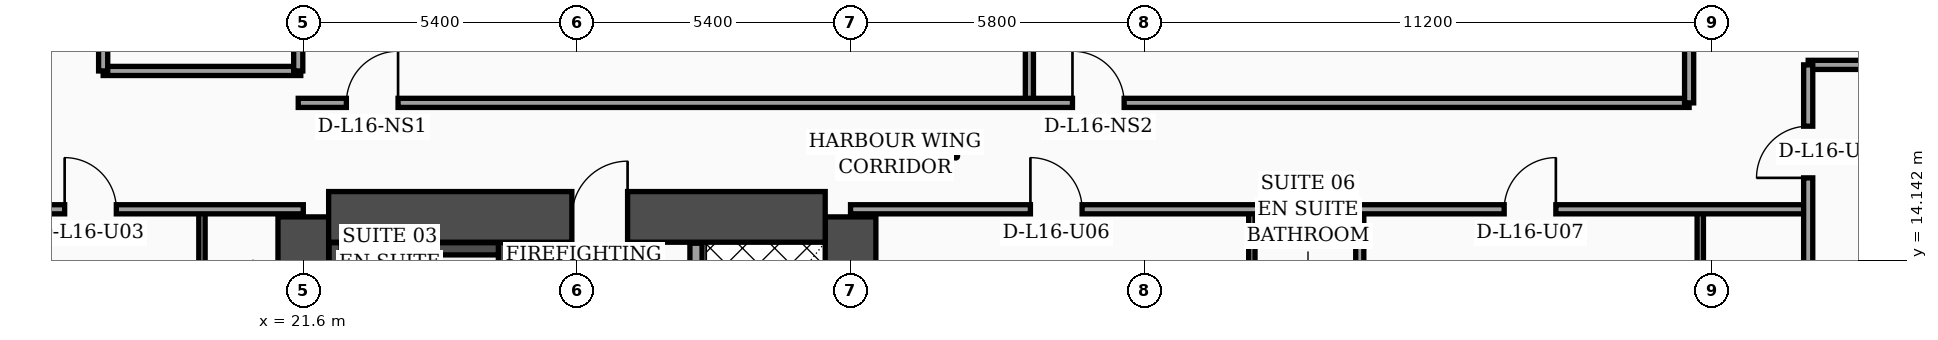
"""IFC4 building model, lengths in metres.
Left out: names, types, materials, properties, quantities, classifications, styles, units other than length and angle.
Written with IfcOpenShell. Run it as: python <this file> out.ifc"""

import sys

from ifc_helpers import new_model, si_unit, direction, frame, frame_2d, origin, place, context, subcontext, project, spatial, rectangle, extrude, element, fill, save


model = new_model("IFC4")
c1 = context("Model", 3, precision=1e-05, world=origin(), true_north=direction((0.0, 1.0)))
c2 = subcontext(c1, "Body", "Model", "MODEL_VIEW")
j1 = project(units=[si_unit("LENGTHUNIT", "METRE"), si_unit("PLANEANGLEUNIT", "RADIAN")], contexts=[c1])
p1 = place(None, origin())
s1 = spatial("IfcSite", under=j1, at=p1, CompositionType="ELEMENT")
p2 = place(p1, origin())
s2 = spatial("IfcBuilding", under=s1, at=p2, CompositionType="ELEMENT")
p3 = place(p2, frame((0.0, 0.0, 69.8)))
s3 = spatial("IfcBuildingStorey", under=s2, at=p3, CompositionType="ELEMENT", Elevation=69.8)
for number, where, z_axis, x_axis in (
    (1, (21.6, 4.6, 0.0), (0.0, 0.0, 1.0), (0.0, 1.0, 0.0)),
    (2, (32.4, 4.6, 0.0), (0.0, 0.0, 1.0), (0.0, 1.0, 0.0)),
):
    element("IfcWall", number, at=place(p3, frame(where, z_axis=z_axis, x_axis=x_axis)), inside=s3, PredefinedType="SHEAR", context=c2, shape_type="SweptSolid", body=[
        extrude(rectangle(XDim=10.4, YDim=1.0, at=frame_2d((5.2, 0.0))), origin(), (0.0, 0.0, 1.0), 3.56),
    ])
p4 = place(p3, frame((22.1, 15.0, 0.0), z_axis=(0.0, 0.0, 1.0), x_axis=(1.0, 0.0, 0.0)))
e3 = element("IfcWall", 3, at=p4, inside=s3, PredefinedType="SHEAR", context=c2, shape_type="SweptSolid", body=[
    extrude(rectangle(XDim=9.8, YDim=1.0, at=frame_2d((4.9, 0.0))), origin(), (0.0, 0.0, 1.0), 3.56),
])
p5 = place(p4, frame((4.8, 0.0, 0.0)))
e4 = element("IfcOpeningElement", 4, at=p5, cuts=e3, PredefinedType="OPENING", context=c2, shape_type="SweptSolid", body=[
    extrude(rectangle(XDim=1.1, YDim=2.2, at=frame_2d((0.55, 1.1))), frame((0.0, 0.51, 0.0), z_axis=(0.0, -1.0, 0.0), x_axis=(1.0, 0.0, 0.0)), (0.0, 0.0, 1.0), 1.02),
])
p6 = place(p3, frame((22.23, 5.1, 0.0), z_axis=(0.0, 0.0, 1.0), x_axis=(0.0, 1.0, 0.0)))
e5 = element("IfcWall", 5, at=p6, inside=s3, PredefinedType="SOLIDWALL", context=c2, shape_type="SweptSolid", body=[
    extrude(rectangle(XDim=9.39, YDim=0.24, at=frame_2d((4.695, 0.0))), origin(), (0.0, 0.0, 1.0), 3.56),
])
p7 = place(p3, frame((25.57, 5.1, 0.0), z_axis=(0.0, 0.0, 1.0), x_axis=(0.0, 1.0, 0.0)))
e6 = element("IfcWall", 6, at=p7, inside=s3, PredefinedType="SOLIDWALL", context=c2, shape_type="SweptSolid", body=[
    extrude(rectangle(XDim=9.39, YDim=0.24, at=frame_2d((4.695, 0.0))), origin(), (0.0, 0.0, 1.0), 3.56),
])
p8 = place(p7, frame((0.35, 0.0, 0.0)))
e7 = element("IfcOpeningElement", 7, at=p8, cuts=e6, PredefinedType="OPENING", context=c2, shape_type="SweptSolid", body=[
    extrude(rectangle(XDim=1.15, YDim=2.2, at=frame_2d((0.575, 1.1))), frame((0.0, 0.13, 0.0), z_axis=(0.0, -1.0, 0.0), x_axis=(1.0, 0.0, 0.0)), (0.0, 0.0, 1.0), 0.26),
])
p9 = place(p3, frame((22.35, 14.37, 0.0), z_axis=(0.0, 0.0, 1.0), x_axis=(1.0, 0.0, 0.0)))
e8 = element("IfcWall", 8, at=p9, inside=s3, PredefinedType="SOLIDWALL", context=c2, shape_type="SweptSolid", body=[
    extrude(rectangle(XDim=3.1, YDim=0.24, at=frame_2d((1.55, 0.0))), origin(), (0.0, 0.0, 1.0), 3.56),
])
p10 = place(p3, frame((29.35, 5.12, 0.0), z_axis=(0.0, 0.0, 1.0), x_axis=(0.0, 1.0, 0.0)))
e9 = element("IfcWall", 9, at=p10, inside=s3, PredefinedType="SOLIDWALL", context=c2, shape_type="SweptSolid", body=[
    extrude(rectangle(XDim=9.36, YDim=0.24, at=frame_2d((4.68, 0.0))), origin(), (0.0, 0.0, 1.0), 3.56),
])
p11 = place(p10, frame((0.55, 0.0, 0.0)))
e10 = element("IfcOpeningElement", 10, at=p11, cuts=e9, PredefinedType="OPENING", context=c2, shape_type="SweptSolid", body=[
    extrude(rectangle(XDim=1.3, YDim=2.35, at=frame_2d((0.65, 1.175))), frame((0.0, 0.13, 0.0), z_axis=(0.0, -1.0, 0.0), x_axis=(1.0, 0.0, 0.0)), (0.0, 0.0, 1.0), 0.26),
])
p12 = place(p3, frame((19.6, 2.44, 0.0), z_axis=(0.0, 0.0, 1.0), x_axis=(0.0, 1.0, 0.0)))
e11 = element("IfcWall", 11, at=p12, inside=s3, PredefinedType="PARTITIONING", context=c2, shape_type="SweptSolid", body=[
    extrude(rectangle(XDim=12.71, YDim=0.125, at=frame_2d((6.355, 0.0))), origin(), (0.0, 0.0, 1.0), 2.34),
])
p13 = place(p12, frame((4.34, 0.0, 0.0)))
e12 = element("IfcOpeningElement", 12, at=p13, cuts=e11, PredefinedType="OPENING", context=c2, shape_type="SweptSolid", body=[
    extrude(rectangle(XDim=0.96, YDim=2.2, at=frame_2d((0.48, 1.1))), frame((0.0, 0.073, 0.0), z_axis=(0.0, -1.0, 0.0), x_axis=(1.0, 0.0, 0.0)), (0.0, 0.0, 1.0), 0.145),
])
p14 = place(p12, frame((10.18, 0.0, 0.0)))
e13 = element("IfcOpeningElement", 13, at=p14, cuts=e11, PredefinedType="OPENING", context=c2, shape_type="SweptSolid", body=[
    extrude(rectangle(XDim=0.9, YDim=2.15, at=frame_2d((0.45, 1.075))), frame((0.0, 0.073, 0.0), z_axis=(0.0, -1.0, 0.0), x_axis=(1.0, 0.0, 0.0)), (0.0, 0.0, 1.0), 0.145),
])
p15 = place(p3, frame((15.15, 15.15, 0.0), z_axis=(0.0, 0.0, 1.0), x_axis=(1.0, 0.0, 0.0)))
e14 = element("IfcWall", 14, at=p15, inside=s3, PredefinedType="PARTITIONING", context=c2, shape_type="SweptSolid", body=[
    extrude(rectangle(XDim=6.45, YDim=0.18, at=frame_2d((3.225, 0.0))), origin(), (0.0, 0.0, 1.0), 2.34),
])
p16 = place(p15, frame((1.74, 0.0, 0.0)))
e15 = element("IfcOpeningElement", 15, at=p16, cuts=e14, PredefinedType="OPENING", context=c2, shape_type="SweptSolid", body=[
    extrude(rectangle(XDim=1.02, YDim=2.2, at=frame_2d((0.51, 1.1))), frame((0.0, 0.1, 0.0), z_axis=(0.0, -1.0, 0.0), x_axis=(1.0, 0.0, 0.0)), (0.0, 0.0, 1.0), 0.2),
])
p17 = place(p3, frame((17.65, 17.88, 0.0), z_axis=(0.0, 0.0, 1.0), x_axis=(1.0, 0.0, 0.0)))
e16 = element("IfcWall", 16, at=p17, inside=s3, PredefinedType="PARTITIONING", context=c2, shape_type="SweptSolid", body=[
    extrude(rectangle(XDim=3.9, YDim=0.18, at=frame_2d((1.95, 0.0))), origin(), (0.0, 0.0, 1.0), 3.56),
])
p18 = place(p3, frame((21.5, 17.88, 0.0), z_axis=(0.0, 0.0, 1.0), x_axis=(0.0, 1.0, 0.0)))
e17 = element("IfcWall", 17, at=p18, inside=s3, PredefinedType="PARTITIONING", context=c2, shape_type="SweptSolid", body=[
    extrude(rectangle(XDim=6.44, YDim=0.18, at=frame_2d((3.22, 0.0))), origin(), (0.0, 0.0, 1.0), 3.56),
])
p19 = place(p3, frame((17.65, 17.88, 0.0), z_axis=(0.0, 0.0, 1.0), x_axis=(0.0, 1.0, 0.0)))
e18 = element("IfcWall", 18, at=p19, inside=s3, PredefinedType="PARTITIONING", context=c2, shape_type="SweptSolid", body=[
    extrude(rectangle(XDim=6.44, YDim=0.18, at=frame_2d((3.22, 0.0))), origin(), (0.0, 0.0, 1.0), 3.56),
])
p20 = place(p19, frame((0.65, 0.0, 0.0)))
e19 = element("IfcOpeningElement", 19, at=p20, cuts=e18, PredefinedType="OPENING", context=c2, shape_type="SweptSolid", body=[
    extrude(rectangle(XDim=0.98, YDim=2.15, at=frame_2d((0.49, 1.075))), frame((0.0, 0.1, 0.0), z_axis=(0.0, -1.0, 0.0), x_axis=(1.0, 0.0, 0.0)), (0.0, 0.0, 1.0), 0.2),
])
p21 = place(p19, frame((3.97, 0.0, 0.0)))
e20 = element("IfcOpeningElement", 20, at=p21, cuts=e18, PredefinedType="OPENING", context=c2, shape_type="SweptSolid", body=[
    extrude(rectangle(XDim=0.96, YDim=2.2, at=frame_2d((0.48, 1.1))), frame((0.0, 0.1, 0.0), z_axis=(0.0, -1.0, 0.0), x_axis=(1.0, 0.0, 0.0)), (0.0, 0.0, 1.0), 0.2),
])
p22 = place(p3, frame((40.32, 2.44, 0.0), z_axis=(0.0, 0.0, 1.0), x_axis=(0.0, 1.0, 0.0)))
e21 = element("IfcWall", 21, at=p22, inside=s3, PredefinedType="PARTITIONING", context=c2, shape_type="SweptSolid", body=[
    extrude(rectangle(XDim=12.71, YDim=0.125, at=frame_2d((6.355, 0.0))), origin(), (0.0, 0.0, 1.0), 2.84),
])
p23 = place(p22, frame((4.35, 0.0, 0.0)))
e22 = element("IfcOpeningElement", 22, at=p23, cuts=e21, PredefinedType="OPENING", context=c2, shape_type="SweptSolid", body=[
    extrude(rectangle(XDim=0.96, YDim=2.2, at=frame_2d((0.48, 1.1))), frame((0.0, 0.073, 0.0), z_axis=(0.0, -1.0, 0.0), x_axis=(1.0, 0.0, 0.0)), (0.0, 0.0, 1.0), 0.145),
])
p24 = place(p22, frame((10.21, 0.0, 0.0)))
e23 = element("IfcOpeningElement", 23, at=p24, cuts=e21, PredefinedType="OPENING", context=c2, shape_type="SweptSolid", body=[
    extrude(rectangle(XDim=0.9, YDim=2.15, at=frame_2d((0.45, 1.075))), frame((0.0, 0.073, 0.0), z_axis=(0.0, -1.0, 0.0), x_axis=(1.0, 0.0, 0.0)), (0.0, 0.0, 1.0), 0.145),
])
p25 = place(p3, frame((49.17, 2.44, 0.0), z_axis=(0.0, 0.0, 1.0), x_axis=(0.0, 1.0, 0.0)))
e24 = element("IfcWall", 24, at=p25, inside=s3, PredefinedType="PARTITIONING", context=c2, shape_type="SweptSolid", body=[
    extrude(rectangle(XDim=12.71, YDim=0.125, at=frame_2d((6.355, 0.0))), origin(), (0.0, 0.0, 1.0), 2.84),
])
p26 = place(p25, frame((4.35, 0.0, 0.0)))
e25 = element("IfcOpeningElement", 25, at=p26, cuts=e24, PredefinedType="OPENING", context=c2, shape_type="SweptSolid", body=[
    extrude(rectangle(XDim=0.96, YDim=2.2, at=frame_2d((0.48, 1.1))), frame((0.0, 0.073, 0.0), z_axis=(0.0, -1.0, 0.0), x_axis=(1.0, 0.0, 0.0)), (0.0, 0.0, 1.0), 0.145),
])
p27 = place(p25, frame((10.21, 0.0, 0.0)))
e26 = element("IfcOpeningElement", 26, at=p27, cuts=e24, PredefinedType="OPENING", context=c2, shape_type="SweptSolid", body=[
    extrude(rectangle(XDim=0.9, YDim=2.15, at=frame_2d((0.45, 1.075))), frame((0.0, 0.073, 0.0), z_axis=(0.0, -1.0, 0.0), x_axis=(1.0, 0.0, 0.0)), (0.0, 0.0, 1.0), 0.145),
])
p28 = place(p3, frame((42.45, 2.44, 0.0), z_axis=(0.0, 0.0, 1.0), x_axis=(0.0, 1.0, 0.0)))
e27 = element("IfcWall", 27, at=p28, inside=s3, PredefinedType="PARTITIONING", context=c2, shape_type="SweptSolid", body=[
    extrude(rectangle(XDim=12.71, YDim=0.16, at=frame_2d((6.355, 0.0))), origin(), (0.0, 0.0, 1.0), 3.04),
])
p29 = place(p3, frame((32.4, 15.15, 0.0), z_axis=(0.0, 0.0, 1.0), x_axis=(1.0, 0.0, 0.0)))
e28 = element("IfcWall", 28, at=p29, inside=s3, PredefinedType="PARTITIONING", context=c2, shape_type="SweptSolid", body=[
    extrude(rectangle(XDim=18.9, YDim=0.18, at=frame_2d((9.45, 0.0))), origin(), (0.0, 0.0, 1.0), 2.84),
])
p30 = place(p29, frame((3.55, 0.0, 0.0)))
e29 = element("IfcOpeningElement", 29, at=p30, cuts=e28, PredefinedType="OPENING", context=c2, shape_type="SweptSolid", body=[
    extrude(rectangle(XDim=1.02, YDim=2.2, at=frame_2d((0.51, 1.1))), frame((0.0, 0.1, 0.0), z_axis=(0.0, -1.0, 0.0), x_axis=(1.0, 0.0, 0.0)), (0.0, 0.0, 1.0), 0.2),
])
p31 = place(p29, frame((12.9, 0.0, 0.0)))
e30 = element("IfcOpeningElement", 30, at=p31, cuts=e28, PredefinedType="OPENING", context=c2, shape_type="SweptSolid", body=[
    extrude(rectangle(XDim=1.02, YDim=2.2, at=frame_2d((0.51, 1.1))), frame((0.0, 0.1, 0.0), z_axis=(0.0, -1.0, 0.0), x_axis=(1.0, 0.0, 0.0)), (0.0, 0.0, 1.0), 0.2),
])
p32 = place(p3, frame((35.93, 17.25, 0.0), z_axis=(0.0, 0.0, 1.0), x_axis=(0.0, 1.0, 0.0)))
e31 = element("IfcWall", 31, at=p32, inside=s3, PredefinedType="PARTITIONING", context=c2, shape_type="SweptSolid", body=[
    extrude(rectangle(XDim=14.0, YDim=0.16, at=frame_2d((7.0, 0.0))), origin(), (0.0, 0.0, 1.0), 2.84),
])
p33 = place(p3, frame((21.5, 17.25, 0.0), z_axis=(0.0, 0.0, 1.0), x_axis=(1.0, 0.0, 0.0)))
e32 = element("IfcWall", 32, at=p33, inside=s3, PredefinedType="PARTITIONING", context=c2, shape_type="SweptSolid", body=[
    extrude(rectangle(XDim=27.45, YDim=0.18, at=frame_2d((13.725, 0.0))), origin(), (0.0, 0.0, 1.0), 2.84),
])
p34 = place(p33, frame((0.95, 0.0, 0.0)))
e33 = element("IfcOpeningElement", 33, at=p34, cuts=e32, PredefinedType="OPENING", context=c2, shape_type="SweptSolid", body=[
    extrude(rectangle(XDim=1.02, YDim=2.2, at=frame_2d((0.51, 1.1))), frame((0.0, 0.1, 0.0), z_axis=(0.0, -1.0, 0.0), x_axis=(1.0, 0.0, 0.0)), (0.0, 0.0, 1.0), 0.2),
])
p35 = place(p33, frame((15.28, 0.0, 0.0)))
e34 = element("IfcOpeningElement", 34, at=p35, cuts=e32, PredefinedType="OPENING", context=c2, shape_type="SweptSolid", body=[
    extrude(rectangle(XDim=1.02, YDim=2.2, at=frame_2d((0.51, 1.1))), frame((0.0, 0.1, 0.0), z_axis=(0.0, -1.0, 0.0), x_axis=(1.0, 0.0, 0.0)), (0.0, 0.0, 1.0), 0.2),
])
p36 = place(p3, frame((48.95, 17.25, 0.0), z_axis=(0.0, 0.0, 1.0), x_axis=(0.0, 1.0, 0.0)))
e35 = element("IfcWall", 35, at=p36, inside=s3, PredefinedType="PARTITIONING", context=c2, shape_type="SweptSolid", body=[
    extrude(rectangle(XDim=20.15, YDim=0.18, at=frame_2d((10.075, 0.0))), origin(), (0.0, 0.0, 1.0), 2.84),
])
p37 = place(p3, frame((51.3, 18.0, 0.0), z_axis=(0.0, 0.0, 1.0), x_axis=(1.0, 0.0, 0.0)))
e36 = element("IfcWall", 36, at=p37, inside=s3, PredefinedType="PARTITIONING", context=c2, shape_type="SweptSolid", body=[
    extrude(rectangle(XDim=8.33, YDim=0.18, at=frame_2d((4.165, 0.0))), origin(), (0.0, 0.0, 1.0), 3.04),
])
p38 = place(p3, frame((51.3, 2.44, 0.0), z_axis=(0.0, 0.0, 1.0), x_axis=(0.0, 1.0, 0.0)))
e37 = element("IfcWall", 37, at=p38, inside=s3, PredefinedType="PARTITIONING", context=c2, shape_type="SweptSolid", body=[
    extrude(rectangle(XDim=15.56, YDim=0.18, at=frame_2d((7.78, 0.0))), origin(), (0.0, 0.0, 1.0), 3.04),
])
p39 = place(p38, frame((13.33, 0.0, 0.0)))
e38 = element("IfcOpeningElement", 38, at=p39, cuts=e37, PredefinedType="OPENING", context=c2, shape_type="SweptSolid", body=[
    extrude(rectangle(XDim=1.02, YDim=2.2, at=frame_2d((0.51, 1.1))), frame((0.0, 0.1, 0.0), z_axis=(0.0, -1.0, 0.0), x_axis=(1.0, 0.0, 0.0)), (0.0, 0.0, 1.0), 0.2),
])
p40 = place(p16, origin())
e39 = element("IfcDoor", 39, at=p40, inside=s3, OperationType="SINGLE_SWING_LEFT", PredefinedType="DOOR", context=c2, shape_type="SweptSolid", body=[
    extrude(rectangle(XDim=1.02, YDim=2.2, at=frame_2d((0.51, 1.1))), frame((0.0, 0.025, 0.0), z_axis=(0.0, -1.0, 0.0), x_axis=(1.0, 0.0, 0.0)), (0.0, 0.0, 1.0), 0.05),
])
fill(e15, e39)
p41 = place(p30, origin())
e40 = element("IfcDoor", 40, at=p41, inside=s3, OperationType="SINGLE_SWING_LEFT", PredefinedType="DOOR", context=c2, shape_type="SweptSolid", body=[
    extrude(rectangle(XDim=1.02, YDim=2.2, at=frame_2d((0.51, 1.1))), frame((0.0, 0.025, 0.0), z_axis=(0.0, -1.0, 0.0), x_axis=(1.0, 0.0, 0.0)), (0.0, 0.0, 1.0), 0.05),
])
fill(e29, e40)
p42 = place(p31, origin())
e41 = element("IfcDoor", 41, at=p42, inside=s3, OperationType="SINGLE_SWING_RIGHT", PredefinedType="DOOR", context=c2, shape_type="SweptSolid", body=[
    extrude(rectangle(XDim=1.02, YDim=2.2, at=frame_2d((0.51, 1.1))), frame((0.0, 0.025, 0.0), z_axis=(0.0, -1.0, 0.0), x_axis=(1.0, 0.0, 0.0)), (0.0, 0.0, 1.0), 0.05),
])
fill(e30, e41)
p43 = place(p34, origin())
e42 = element("IfcDoor", 42, at=p43, inside=s3, OperationType="SINGLE_SWING_RIGHT", PredefinedType="DOOR", context=c2, shape_type="SweptSolid", body=[
    extrude(rectangle(XDim=1.02, YDim=2.2, at=frame_2d((0.51, 1.1))), frame((0.0, 0.025, 0.0), z_axis=(0.0, -1.0, 0.0), x_axis=(1.0, 0.0, 0.0)), (0.0, 0.0, 1.0), 0.05),
])
fill(e33, e42)
p44 = place(p35, origin())
e43 = element("IfcDoor", 43, at=p44, inside=s3, OperationType="SINGLE_SWING_LEFT", PredefinedType="DOOR", context=c2, shape_type="SweptSolid", body=[
    extrude(rectangle(XDim=1.02, YDim=2.2, at=frame_2d((0.51, 1.1))), frame((0.0, 0.025, 0.0), z_axis=(0.0, -1.0, 0.0), x_axis=(1.0, 0.0, 0.0)), (0.0, 0.0, 1.0), 0.05),
])
fill(e34, e43)
p45 = place(p39, origin())
e44 = element("IfcDoor", 44, at=p45, inside=s3, OperationType="SINGLE_SWING_LEFT", PredefinedType="DOOR", context=c2, shape_type="SweptSolid", body=[
    extrude(rectangle(XDim=1.02, YDim=2.2, at=frame_2d((0.51, 1.1))), frame((0.0, 0.025, 0.0), z_axis=(0.0, -1.0, 0.0), x_axis=(1.0, 0.0, 0.0)), (0.0, 0.0, 1.0), 0.05),
])
fill(e38, e44)
p46 = place(p5, origin())
e45 = element("IfcDoor", 45, at=p46, inside=s3, OperationType="SINGLE_SWING_RIGHT", PredefinedType="DOOR", context=c2, shape_type="SweptSolid", body=[
    extrude(rectangle(XDim=1.1, YDim=2.2, at=frame_2d((0.55, 1.1))), frame((0.0, 0.025, 0.0), z_axis=(0.0, -1.0, 0.0), x_axis=(1.0, 0.0, 0.0)), (0.0, 0.0, 1.0), 0.05),
])
fill(e4, e45)
save(model, sys.argv[1])
